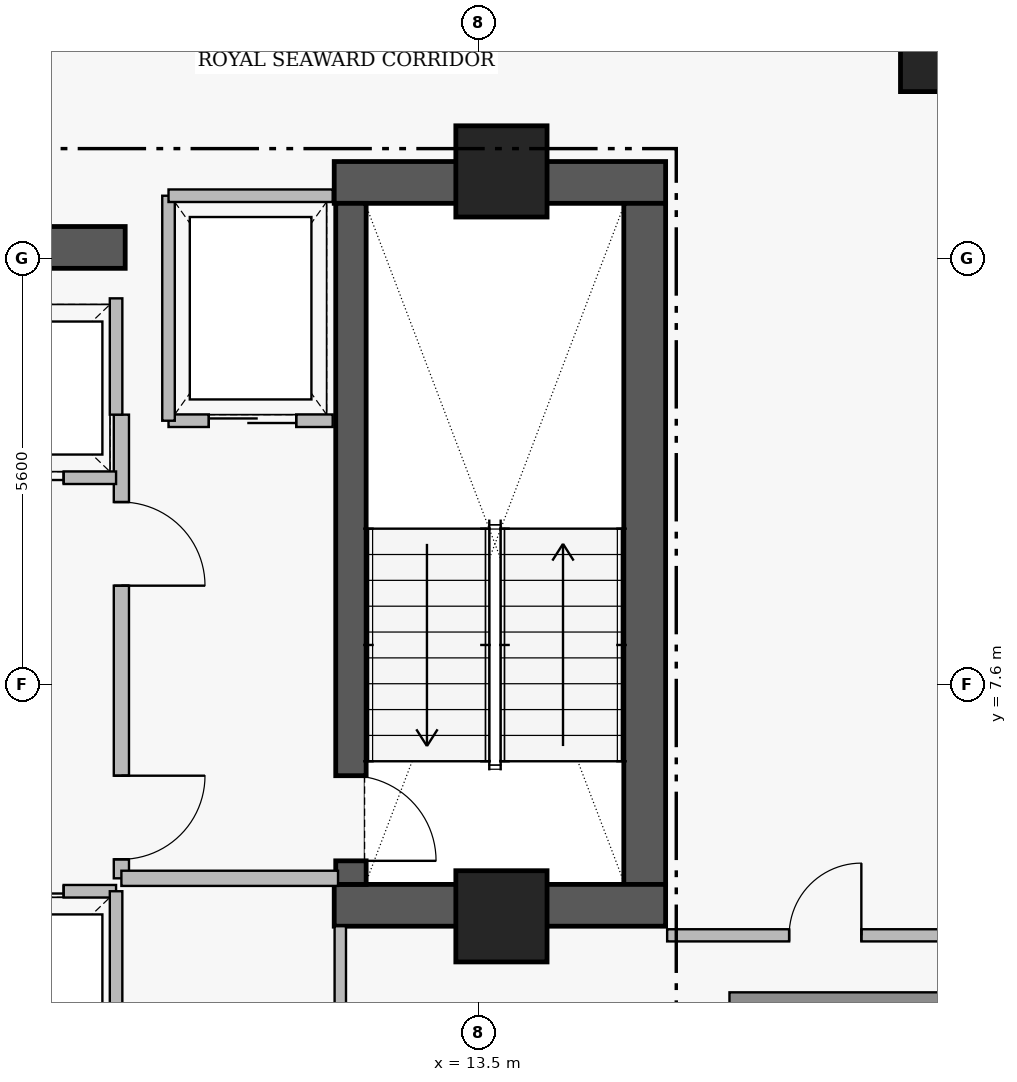
"""IFC4 building model, lengths in metres.
Left out: names, types, materials, properties, quantities, classifications, styles, units other than length and angle.
Written with IfcOpenShell. Run it as: python <this file> out.ifc"""

import sys

from ifc_helpers import new_model, si_unit, direction, frame, frame_2d, origin, origin_2d, place, context, subcontext, project, spatial, rectangle, extrude, element, fill, save


model = new_model("IFC4")
c1 = context("Model", 3, precision=1e-05, world=origin(), true_north=direction((0.0, 1.0)))
c2 = subcontext(c1, "Body", "Model", "MODEL_VIEW")
j1 = project(units=[si_unit("LENGTHUNIT", "METRE"), si_unit("PLANEANGLEUNIT", "RADIAN")], contexts=[c1])
p1 = place(None, origin())
s1 = spatial("IfcSite", under=j1, at=p1, CompositionType="ELEMENT")
p2 = place(p1, origin())
s2 = spatial("IfcBuilding", under=s1, at=p2, CompositionType="ELEMENT")
p3 = place(p2, frame((0.0, 0.0, 280.35)))
s3 = spatial("IfcBuildingStorey", under=s2, at=p3, CompositionType="ELEMENT", Elevation=280.35)
p4 = place(p3, frame((11.6, 14.205, 0.0), z_axis=(0.0, 0.0, 1.0), x_axis=(1.0, 0.0, 0.0)))
e1 = element("IfcWall", 1, at=p4, inside=s3, PredefinedType="SHEAR", context=c2, shape_type="SweptSolid", body=[
    extrude(rectangle(XDim=4.36, YDim=0.55, at=frame_2d((2.18, 0.0))), origin(), (0.0, 0.0, 1.0), 3.51),
])
p5 = place(p3, frame((15.685, 4.97, 0.0), z_axis=(0.0, 0.0, 1.0), x_axis=(0.0, 1.0, 0.0)))
e2 = element("IfcWall", 2, at=p5, inside=s3, PredefinedType="SHEAR", context=c2, shape_type="SweptSolid", body=[
    extrude(rectangle(XDim=8.96, YDim=0.55, at=frame_2d((4.48, 0.0))), origin(), (0.0, 0.0, 1.0), 3.51),
])
p6 = place(p3, frame((11.6, 4.695, 0.0), z_axis=(0.0, 0.0, 1.0), x_axis=(1.0, 0.0, 0.0)))
e3 = element("IfcWall", 3, at=p6, inside=s3, PredefinedType="SHEAR", context=c2, shape_type="SweptSolid", body=[
    extrude(rectangle(XDim=4.36, YDim=0.55, at=frame_2d((2.18, 0.0))), origin(), (0.0, 0.0, 1.0), 3.51),
])
p7 = place(p3, frame((1.25, 13.35, 0.0), z_axis=(0.0, 0.0, 1.0), x_axis=(1.0, 0.0, 0.0)))
e4 = element("IfcWall", 4, at=p7, inside=s3, PredefinedType="SHEAR", context=c2, shape_type="SweptSolid", body=[
    extrude(rectangle(XDim=7.6, YDim=0.55, at=frame_2d((3.8, 0.0))), origin(), (0.0, 0.0, 1.0), 3.48),
])
p8 = place(p3, frame((11.82, 13.93, 0.0), z_axis=(0.0, 0.0, 1.0), x_axis=(0.0, -1.0, 0.0)))
e5 = element("IfcWall", 5, at=p8, inside=s3, PredefinedType="SHEAR", context=c2, shape_type="SweptSolid", body=[
    extrude(rectangle(XDim=8.96, YDim=0.4, at=frame_2d((4.48, 0.0))), origin(), (0.0, 0.0, 1.0), 3.51),
])
p9 = place(p8, frame((7.53, 0.0, 0.0)))
e6 = element("IfcOpeningElement", 6, at=p9, cuts=e5, PredefinedType="OPENING", context=c2, shape_type="SweptSolid", body=[
    extrude(rectangle(XDim=1.12, YDim=2.22, at=frame_2d((0.56, 1.11))), frame((0.0, 0.21, 0.0), z_axis=(0.0, -1.0, 0.0), x_axis=(1.0, 0.0, 0.0)), (0.0, 0.0, 1.0), 0.42),
])
for number, where, z_axis, x_axis in (
    (7, (13.8, 14.35, 0.0), (0.0, 0.0, 1.0), (1.0, 0.0, 0.0)),
    (8, (13.8, 4.55, 0.0), (0.0, 0.0, 1.0), (1.0, 0.0, 0.0)),
):
    element("IfcColumn", number, at=place(p3, frame(where, z_axis=z_axis, x_axis=x_axis)), inside=s3, PredefinedType="COLUMN", context=c2, shape_type="SweptSolid", body=[
        extrude(rectangle(XDim=1.2, YDim=1.2, at=origin_2d()), origin(), (0.0, 0.0, 1.0), 3.7),
    ])
p10 = place(p3, frame((19.55, 15.9, 0.0), z_axis=(0.0, 0.0, 1.0), x_axis=(1.0, 0.0, 0.0)))
e9 = element("IfcColumn", 9, at=p10, inside=s3, PredefinedType="COLUMN", context=c2, shape_type="SweptSolid", body=[
    extrude(rectangle(XDim=1.0, YDim=1.0, at=origin_2d()), origin(), (0.0, 0.0, 1.0), 3.7),
])
p11 = place(p3, frame((20.2, 3.4, 0.0), z_axis=(0.0, 0.0, 1.0), x_axis=(-1.0, 0.0, 0.0)))
e10 = element("IfcWall", 10, at=p11, inside=s3, PredefinedType="STANDARD", context=c2, shape_type="SweptSolid", body=[
    extrude(rectangle(XDim=3.4, YDim=0.3, at=frame_2d((1.7, 0.0))), origin(), (0.0, 0.0, 1.0), 3.48),
])
p12 = place(p3, frame((8.8, 11.15, 0.0), z_axis=(0.0, 0.0, 1.0), x_axis=(0.0, -1.0, 0.0)))
e11 = element("IfcWall", 11, at=p12, inside=s3, PredefinedType="PARTITIONING", context=c2, shape_type="SweptSolid", body=[
    extrude(rectangle(XDim=6.1, YDim=0.2, at=frame_2d((3.05, 0.0))), origin(), (0.0, 0.0, 1.0), 3.48),
])
p13 = place(p12, frame((1.15, 0.0, 0.0)))
e12 = element("IfcOpeningElement", 12, at=p13, cuts=e11, PredefinedType="OPENING", context=c2, shape_type="SweptSolid", body=[
    extrude(rectangle(XDim=1.1, YDim=2.2, at=frame_2d((0.55, 1.1))), frame((0.0, 0.11, 0.0), z_axis=(0.0, -1.0, 0.0), x_axis=(1.0, 0.0, 0.0)), (0.0, 0.0, 1.0), 0.22),
])
p14 = place(p12, frame((4.75, 0.0, 0.0)))
e13 = element("IfcOpeningElement", 13, at=p14, cuts=e11, PredefinedType="OPENING", context=c2, shape_type="SweptSolid", body=[
    extrude(rectangle(XDim=1.1, YDim=2.2, at=frame_2d((0.55, 1.1))), frame((0.0, 0.11, 0.0), z_axis=(0.0, -1.0, 0.0), x_axis=(1.0, 0.0, 0.0)), (0.0, 0.0, 1.0), 0.22),
])
p15 = place(p3, frame((9.42, 11.07, 0.0), z_axis=(0.0, 0.0, 1.0), x_axis=(1.0, 0.0, 0.0)))
e14 = element("IfcWall", 14, at=p15, inside=s3, PredefinedType="PARTITIONING", context=c2, shape_type="SweptSolid", body=[
    extrude(rectangle(XDim=2.16, YDim=0.165, at=frame_2d((1.08, 0.0))), origin(), (0.0, 0.0, 1.0), 3.48),
])
p16 = place(p15, frame((0.53, 0.0, 0.0)))
e15 = element("IfcOpeningElement", 15, at=p16, cuts=e14, PredefinedType="OPENING", context=c2, shape_type="SweptSolid", body=[
    extrude(rectangle(XDim=1.15, YDim=2.25, at=frame_2d((0.575, 1.125))), frame((0.0, 0.093, 0.0), z_axis=(0.0, -1.0, 0.0), x_axis=(1.0, 0.0, 0.0)), (0.0, 0.0, 1.0), 0.185),
])
p17 = place(p3, frame((6.25, 4.88, 0.0), z_axis=(0.0, 0.0, 1.0), x_axis=(1.0, 0.0, 0.0)))
e16 = element("IfcWall", 16, at=p17, inside=s3, PredefinedType="PARTITIONING", context=c2, shape_type="SweptSolid", body=[
    extrude(rectangle(XDim=2.48, YDim=0.165, at=frame_2d((1.24, 0.0))), origin(), (0.0, 0.0, 1.0), 3.48),
])
p18 = place(p17, frame((0.69, 0.0, 0.0)))
e17 = element("IfcOpeningElement", 17, at=p18, cuts=e16, PredefinedType="OPENING", context=c2, shape_type="SweptSolid", body=[
    extrude(rectangle(XDim=1.1, YDim=2.25, at=frame_2d((0.55, 1.125))), frame((0.0, 0.093, 0.0), z_axis=(0.0, -1.0, 0.0), x_axis=(1.0, 0.0, 0.0)), (0.0, 0.0, 1.0), 0.185),
])
p19 = place(p3, frame((6.25, 10.32, 0.0), z_axis=(0.0, 0.0, 1.0), x_axis=(1.0, 0.0, 0.0)))
e18 = element("IfcWall", 18, at=p19, inside=s3, PredefinedType="PARTITIONING", context=c2, shape_type="SweptSolid", body=[
    extrude(rectangle(XDim=2.48, YDim=0.165, at=frame_2d((1.24, 0.0))), origin(), (0.0, 0.0, 1.0), 3.48),
])
p20 = place(p19, frame((0.69, 0.0, 0.0)))
e19 = element("IfcOpeningElement", 19, at=p20, cuts=e18, PredefinedType="OPENING", context=c2, shape_type="SweptSolid", body=[
    extrude(rectangle(XDim=1.1, YDim=2.25, at=frame_2d((0.55, 1.125))), frame((0.0, 0.093, 0.0), z_axis=(0.0, -1.0, 0.0), x_axis=(1.0, 0.0, 0.0)), (0.0, 0.0, 1.0), 0.185),
])
p21 = place(p3, frame((15.98, 4.3, 0.0), z_axis=(0.0, 0.0, 1.0), x_axis=(1.0, 0.0, 0.0)))
e20 = element("IfcWall", 20, at=p21, inside=s3, PredefinedType="PARTITIONING", context=c2, shape_type="SweptSolid", body=[
    extrude(rectangle(XDim=4.16, YDim=0.16, at=frame_2d((2.08, 0.0))), origin(), (0.0, 0.0, 1.0), 3.48),
])
p22 = place(p21, frame((1.605, 0.0, 0.0)))
e21 = element("IfcOpeningElement", 21, at=p22, cuts=e20, PredefinedType="OPENING", context=c2, shape_type="SweptSolid", body=[
    extrude(rectangle(XDim=0.95, YDim=2.15, at=frame_2d((0.475, 1.075))), frame((0.0, 0.09, 0.0), z_axis=(0.0, -1.0, 0.0), x_axis=(1.0, 0.0, 0.0)), (0.0, 0.0, 1.0), 0.18),
])
p23 = place(p3, frame((8.8, 5.05, 0.0), z_axis=(0.0, 0.0, 1.0), x_axis=(1.0, 0.0, 0.0)))
e22 = element("IfcWall", 22, at=p23, inside=s3, PredefinedType="PARTITIONING", context=c2, shape_type="SweptSolid", body=[
    extrude(rectangle(XDim=2.85, YDim=0.2, at=frame_2d((1.425, 0.0))), origin(), (0.0, 0.0, 1.0), 3.48),
])
p24 = place(p3, frame((9.42, 11.07, 0.0), z_axis=(0.0, 0.0, 1.0), x_axis=(0.0, 1.0, 0.0)))
e23 = element("IfcWall", 23, at=p24, inside=s3, PredefinedType="PARTITIONING", context=c2, shape_type="SweptSolid", body=[
    extrude(rectangle(XDim=2.96, YDim=0.165, at=frame_2d((1.48, 0.0))), origin(), (0.0, 0.0, 1.0), 3.48),
])
p25 = place(p3, frame((9.42, 14.03, 0.0), z_axis=(0.0, 0.0, 1.0), x_axis=(1.0, 0.0, 0.0)))
e24 = element("IfcWall", 24, at=p25, inside=s3, PredefinedType="PARTITIONING", context=c2, shape_type="SweptSolid", body=[
    extrude(rectangle(XDim=2.16, YDim=0.165, at=frame_2d((1.08, 0.0))), origin(), (0.0, 0.0, 1.0), 3.48),
])
p26 = place(p3, frame((8.73, 2.52, 0.0), z_axis=(0.0, 0.0, 1.0), x_axis=(0.0, 1.0, 0.0)))
e25 = element("IfcWall", 25, at=p26, inside=s3, PredefinedType="PARTITIONING", context=c2, shape_type="SweptSolid", body=[
    extrude(rectangle(XDim=2.36, YDim=0.165, at=frame_2d((1.18, 0.0))), origin(), (0.0, 0.0, 1.0), 3.48),
])
p27 = place(p3, frame((8.73, 11.15, 0.0), z_axis=(0.0, 0.0, 1.0), x_axis=(0.0, 1.0, 0.0)))
e26 = element("IfcWall", 26, at=p27, inside=s3, PredefinedType="PARTITIONING", context=c2, shape_type="SweptSolid", body=[
    extrude(rectangle(XDim=1.53, YDim=0.165, at=frame_2d((0.765, 0.0))), origin(), (0.0, 0.0, 1.0), 3.48),
])
p28 = place(p3, frame((11.68, 1.72, 0.0), z_axis=(0.0, 0.0, 1.0), x_axis=(0.0, 1.0, 0.0)))
e27 = element("IfcWall", 27, at=p28, inside=s3, PredefinedType="PARTITIONING", context=c2, shape_type="SweptSolid", body=[
    extrude(rectangle(XDim=2.7, YDim=0.15, at=frame_2d((1.35, 0.0))), origin(), (0.0, 0.0, 1.0), 3.48),
])
p29 = place(p9, origin())
e28 = element("IfcDoor", 28, at=p29, inside=s3, OperationType="SINGLE_SWING_RIGHT", PredefinedType="DOOR", context=c2, shape_type="SweptSolid", body=[
    extrude(rectangle(XDim=1.12, YDim=2.22, at=frame_2d((0.56, 1.11))), frame((0.0, 0.025, 0.0), z_axis=(0.0, -1.0, 0.0), x_axis=(1.0, 0.0, 0.0)), (0.0, 0.0, 1.0), 0.05),
])
fill(e6, e28)
p30 = place(p13, origin())
e29 = element("IfcDoor", 29, at=p30, inside=s3, OperationType="SINGLE_SWING_RIGHT", PredefinedType="DOOR", context=c2, shape_type="SweptSolid", body=[
    extrude(rectangle(XDim=1.1, YDim=2.2, at=frame_2d((0.55, 1.1))), frame((0.0, 0.025, 0.0), z_axis=(0.0, -1.0, 0.0), x_axis=(1.0, 0.0, 0.0)), (0.0, 0.0, 1.0), 0.05),
])
fill(e12, e29)
p31 = place(p14, origin())
e30 = element("IfcDoor", 30, at=p31, inside=s3, OperationType="SINGLE_SWING_LEFT", PredefinedType="DOOR", context=c2, shape_type="SweptSolid", body=[
    extrude(rectangle(XDim=1.1, YDim=2.2, at=frame_2d((0.55, 1.1))), frame((0.0, 0.025, 0.0), z_axis=(0.0, -1.0, 0.0), x_axis=(1.0, 0.0, 0.0)), (0.0, 0.0, 1.0), 0.05),
])
fill(e13, e30)
p32 = place(p16, origin())
e31 = element("IfcDoor", 31, at=p32, inside=s3, OperationType="SLIDING_TO_LEFT", PredefinedType="DOOR", context=c2, shape_type="SweptSolid", body=[
    extrude(rectangle(XDim=1.15, YDim=2.25, at=frame_2d((0.575, 1.125))), frame((0.0, 0.025, 0.0), z_axis=(0.0, -1.0, 0.0), x_axis=(1.0, 0.0, 0.0)), (0.0, 0.0, 1.0), 0.05),
])
fill(e15, e31)
p33 = place(p18, origin())
e32 = element("IfcDoor", 32, at=p33, inside=s3, OperationType="SLIDING_TO_LEFT", PredefinedType="DOOR", context=c2, shape_type="SweptSolid", body=[
    extrude(rectangle(XDim=1.1, YDim=2.25, at=frame_2d((0.55, 1.125))), frame((0.0, 0.025, 0.0), z_axis=(0.0, -1.0, 0.0), x_axis=(1.0, 0.0, 0.0)), (0.0, 0.0, 1.0), 0.05),
])
fill(e17, e32)
p34 = place(p20, origin())
e33 = element("IfcDoor", 33, at=p34, inside=s3, OperationType="SLIDING_TO_LEFT", PredefinedType="DOOR", context=c2, shape_type="SweptSolid", body=[
    extrude(rectangle(XDim=1.1, YDim=2.25, at=frame_2d((0.55, 1.125))), frame((0.0, 0.025, 0.0), z_axis=(0.0, -1.0, 0.0), x_axis=(1.0, 0.0, 0.0)), (0.0, 0.0, 1.0), 0.05),
])
fill(e19, e33)
p35 = place(p22, origin())
e34 = element("IfcDoor", 34, at=p35, inside=s3, OperationType="SINGLE_SWING_RIGHT", PredefinedType="DOOR", context=c2, shape_type="SweptSolid", body=[
    extrude(rectangle(XDim=0.95, YDim=2.15, at=frame_2d((0.475, 1.075))), frame((0.0, 0.025, 0.0), z_axis=(0.0, -1.0, 0.0), x_axis=(1.0, 0.0, 0.0)), (0.0, 0.0, 1.0), 0.05),
])
fill(e21, e34)
save(model, sys.argv[1])
